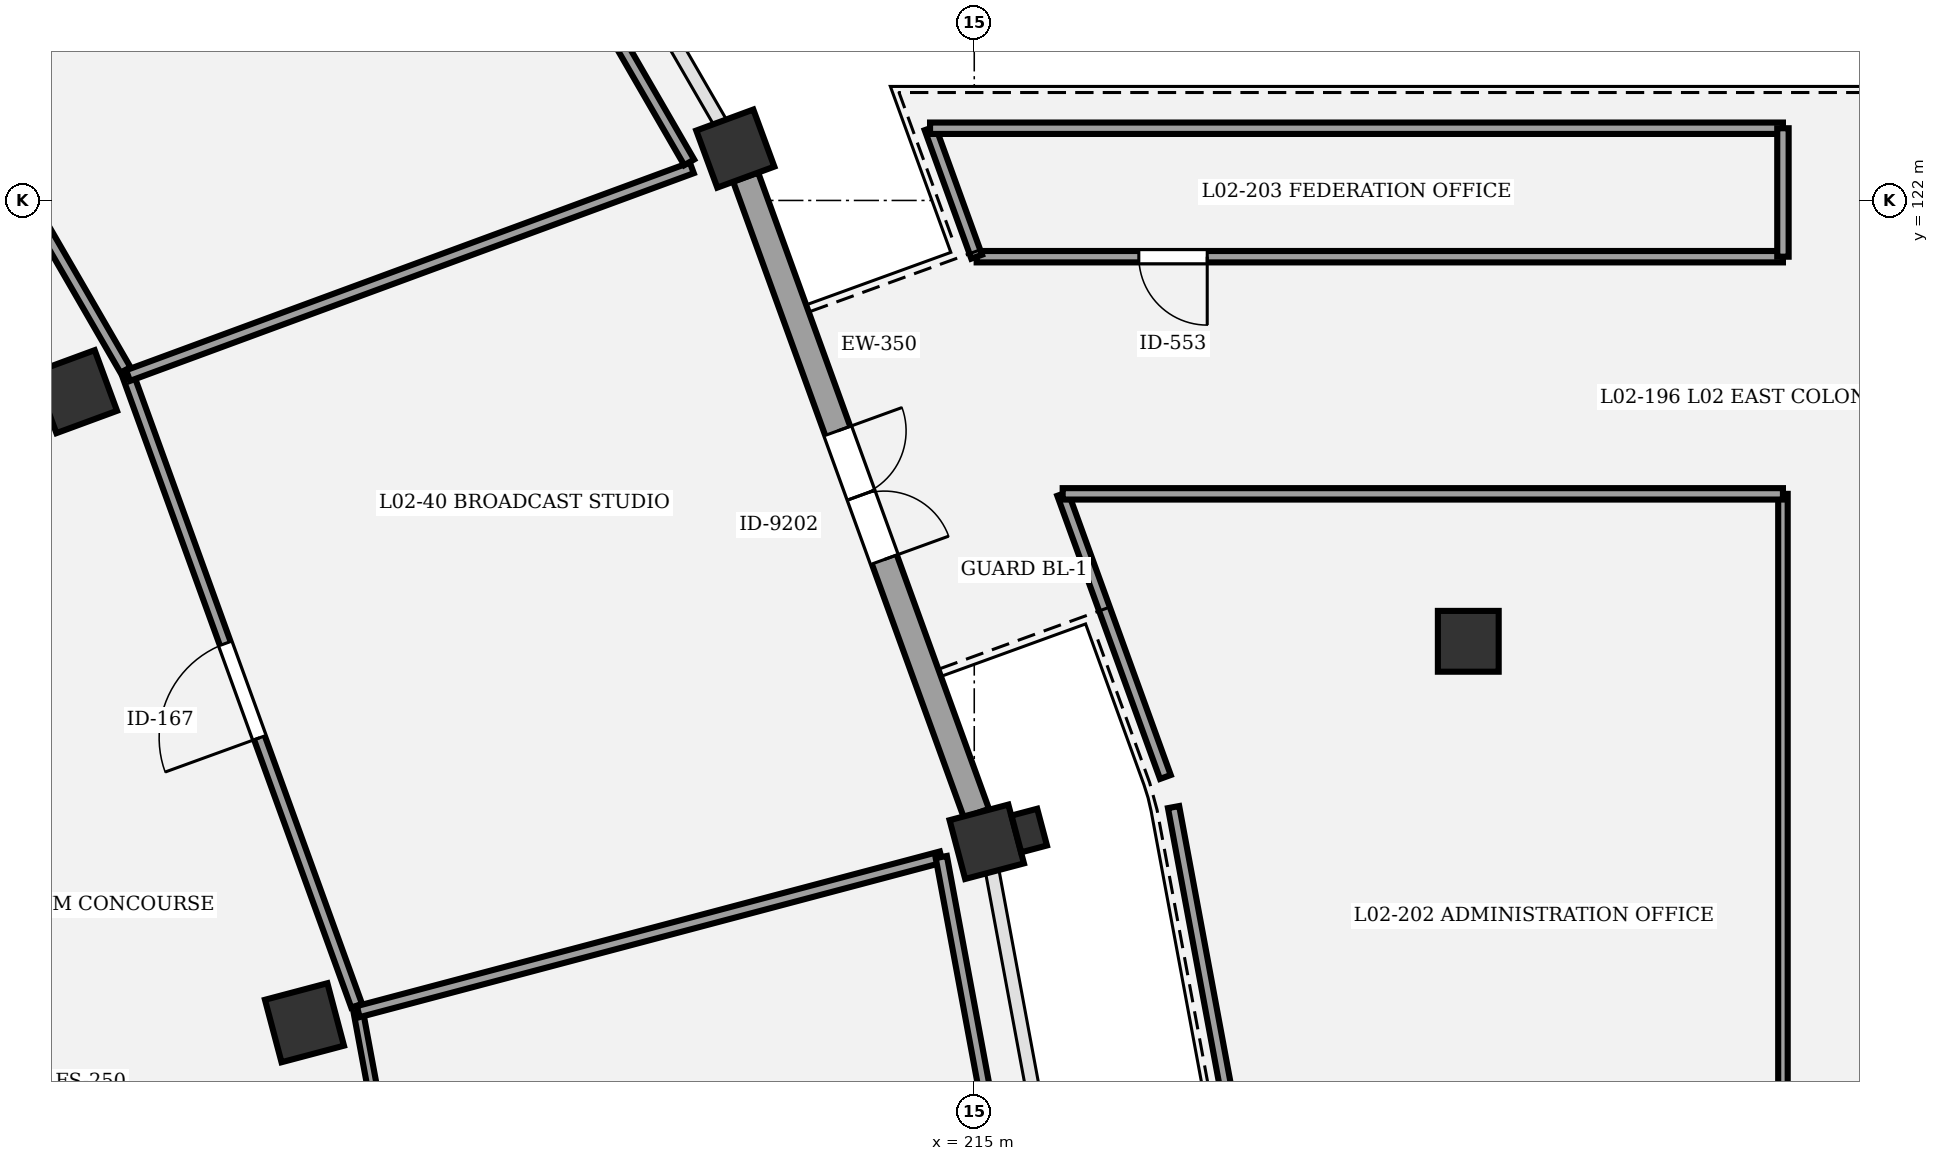
"""IFC4 building model, lengths in metres.
Left out: names, types, materials, properties, quantities, classifications, styles, units other than length and angle.
Written with IfcOpenShell. Run it as: python <this file> out.ifc"""

import sys

from ifc_helpers import new_model, si_unit, direction, frame, frame_2d, origin, origin_2d, place, context, subcontext, project, spatial, rectangle, circle, extrude, element, fill, save


model = new_model("IFC4")
c1 = context("Model", 3, precision=1e-05, world=origin(), true_north=direction((0.0, 1.0)))
c2 = subcontext(c1, "Body", "Model", "MODEL_VIEW")
j1 = project(units=[si_unit("LENGTHUNIT", "METRE"), si_unit("PLANEANGLEUNIT", "RADIAN")], contexts=[c1])
p1 = place(None, origin())
s1 = spatial("IfcSite", under=j1, at=p1, CompositionType="ELEMENT")
p2 = place(p1, origin())
s2 = spatial("IfcBuilding", under=s1, at=p2, CompositionType="ELEMENT")
p3 = place(p2, frame((0.0, 0.0, 10.2)))
s3 = spatial("IfcBuildingStorey", under=s2, at=p3, CompositionType="ELEMENT", Elevation=10.2)
p4 = place(p3, frame((206.188, 111.182, 0.0), z_axis=(0.0, 0.0, 1.0), x_axis=(0.966600102017, 0.256289373133, 0.0)))
e1 = element("IfcColumn", 1, at=p4, inside=s3, PredefinedType="COLUMN", context=c2, shape_type="SweptSolid", body=[
    extrude(rectangle(XDim=0.85, YDim=0.85, at=origin_2d()), origin(), (0.0, 0.0, 1.0), 4.5),
])
p5 = place(p3, frame((215.165, 113.562, 0.0), z_axis=(0.0, 0.0, 1.0), x_axis=(0.966600102017, 0.256289373133, 0.0)))
e2 = element("IfcColumn", 2, at=p5, inside=s3, PredefinedType="COLUMN", context=c2, shape_type="SweptSolid", body=[
    extrude(rectangle(XDim=0.8, YDim=0.8, at=origin_2d()), origin(), (0.0, 0.0, 1.0), 4.5),
])
p6 = place(p3, frame((215.723, 113.711, 0.0), z_axis=(0.0, 0.0, 1.0), x_axis=(-0.256289373133, 0.966600102017, 0.0)))
e3 = element("IfcColumn", 3, at=p6, inside=s3, PredefinedType="PILASTER", context=c2, shape_type="SweptSolid", body=[
    extrude(rectangle(XDim=0.5, YDim=0.35, at=origin_2d()), origin(), (0.0, 0.0, 1.0), 4.5),
])
p7 = place(p3, frame((203.176, 119.484, 0.0), z_axis=(0.0, 0.0, 1.0), x_axis=(0.938372433776, 0.34562577382, 0.0)))
e4 = element("IfcColumn", 4, at=p7, inside=s3, PredefinedType="COLUMN", context=c2, shape_type="SweptSolid", body=[
    extrude(rectangle(XDim=0.85, YDim=0.85, at=origin_2d()), origin(), (0.0, 0.0, 1.0), 4.5),
])
p8 = place(p3, frame((211.856, 122.682, 0.0), z_axis=(0.0, 0.0, 1.0), x_axis=(0.938372433776, 0.34562577382, 0.0)))
e5 = element("IfcColumn", 5, at=p8, inside=s3, PredefinedType="COLUMN", context=c2, shape_type="SweptSolid", body=[
    extrude(rectangle(XDim=0.8, YDim=0.8, at=origin_2d()), origin(), (0.0, 0.0, 1.0), 4.5),
])
p9 = place(p3, frame((221.5, 116.2, 0.0), z_axis=(0.0, 0.0, 1.0), x_axis=(1.0, 0.0, 0.0)))
e6 = element("IfcColumn", 6, at=p9, inside=s3, PredefinedType="COLUMN", context=c2, shape_type="SweptSolid", body=[
    extrude(circle(Radius=0.4, at=origin_2d()), origin(), (0.0, 0.0, 1.0), 4.5),
])
p10 = place(p3, frame((211.992, 122.308, 0.0), z_axis=(0.0, 0.0, 1.0), x_axis=(0.34103858998, -0.940049296657, 0.0)))
e7 = element("IfcWall", 7, at=p10, inside=s3, PredefinedType="STANDARD", context=c2, shape_type="SweptSolid", body=[
    extrude(rectangle(XDim=8.906, YDim=0.35, at=frame_2d((4.453, 0.0))), origin(), (0.0, 0.0, 1.0), 3.42),
])
p11 = place(p10, frame((3.553, 0.0, 0.0)))
e8 = element("IfcOpeningElement", 8, at=p11, cuts=e7, PredefinedType="OPENING", context=c2, shape_type="SweptSolid", body=[
    extrude(rectangle(XDim=1.8, YDim=2.4, at=frame_2d((0.9, 1.2))), frame((0.0, 0.185, 0.0), z_axis=(0.0, -1.0, 0.0), x_axis=(1.0, 0.0, 0.0)), (0.0, 0.0, 1.0), 0.37),
])
p12 = place(p3, frame((208.707, 101.575, 0.0), z_axis=(0.0, 0.0, 1.0), x_axis=(-0.182618024057, 0.983183938686, 0.0)))
e9 = element("IfcWall", 9, at=p12, inside=s3, PredefinedType="PARTITIONING", context=c2, shape_type="SweptSolid", body=[
    extrude(rectangle(XDim=9.92, YDim=0.125, at=frame_2d((4.96, 0.0))), origin(), (0.0, 0.0, 1.0), 3.25),
])
p13 = place(p12, frame((4.35, 0.0, 0.0)))
e10 = element("IfcOpeningElement", 10, at=p13, cuts=e9, PredefinedType="OPENING", context=c2, shape_type="SweptSolid", body=[
    extrude(rectangle(XDim=1.22, YDim=2.2, at=frame_2d((0.61, 1.1))), frame((0.0, 0.073, 0.0), z_axis=(0.0, -1.0, 0.0), x_axis=(1.0, 0.0, 0.0)), (0.0, 0.0, 1.0), 0.145),
])
p14 = place(p3, frame((206.874, 111.405, 0.0), z_axis=(0.0, 0.0, 1.0), x_axis=(-0.341031741571, 0.940051781149, 0.0)))
e11 = element("IfcWall", 11, at=p14, inside=s3, PredefinedType="PARTITIONING", context=c2, shape_type="SweptSolid", body=[
    extrude(rectangle(XDim=8.82, YDim=0.15, at=frame_2d((4.41, 0.0))), origin(), (0.0, 0.0, 1.0), 3.25),
])
p15 = place(p14, frame((3.75, 0.0, 0.0)))
e12 = element("IfcOpeningElement", 12, at=p15, cuts=e11, PredefinedType="OPENING", context=c2, shape_type="SweptSolid", body=[
    extrude(rectangle(XDim=1.32, YDim=2.2, at=frame_2d((0.66, 1.1))), frame((0.0, 0.085, 0.0), z_axis=(0.0, -1.0, 0.0), x_axis=(1.0, 0.0, 0.0)), (0.0, 0.0, 1.0), 0.17),
])
p16 = place(p3, frame((203.833, 119.769, 0.0), z_axis=(0.0, 0.0, 1.0), x_axis=(-0.500559280672, 0.865702262059, 0.0)))
e13 = element("IfcWall", 13, at=p16, inside=s3, PredefinedType="PARTITIONING", context=c2, shape_type="SweptSolid", body=[
    extrude(rectangle(XDim=8.375, YDim=0.15, at=frame_2d((4.187, 0.0))), origin(), (0.0, 0.0, 1.0), 3.25),
])
p17 = place(p16, frame((3.737, 0.0, 0.0)))
e14 = element("IfcOpeningElement", 14, at=p17, cuts=e13, PredefinedType="OPENING", context=c2, shape_type="SweptSolid", body=[
    extrude(rectangle(XDim=0.9, YDim=2.3, at=frame_2d((0.45, 1.15))), frame((0.0, 0.085, 0.0), z_axis=(0.0, -1.0, 0.0), x_axis=(1.0, 0.0, 0.0)), (0.0, 0.0, 1.0), 0.17),
])
p18 = place(p3, frame((225.64, 118.14, 0.0), z_axis=(0.0, 0.0, 1.0), x_axis=(0.0, -1.0, 0.0)))
e15 = element("IfcWall", 15, at=p18, inside=s3, PredefinedType="PARTITIONING", context=c2, shape_type="SweptSolid", body=[
    extrude(rectangle(XDim=18.69, YDim=0.125, at=frame_2d((9.345, 0.0))), origin(), (0.0, 0.0, 1.0), 3.25),
])
p19 = place(p18, frame((11.143, 0.0, 0.0)))
e16 = element("IfcOpeningElement", 16, at=p19, cuts=e15, PredefinedType="OPENING", context=c2, shape_type="SweptSolid", body=[
    extrude(rectangle(XDim=1.4, YDim=2.1, at=frame_2d((0.7, 1.05))), frame((0.0, 0.073, 0.0), z_axis=(0.0, -1.0, 0.0), x_axis=(1.0, 0.0, 0.0)), (0.0, 0.0, 1.0), 0.145),
])
p20 = place(p3, frame((225.64, 121.26, 0.0), z_axis=(0.0, 0.0, 1.0), x_axis=(-1.0, 0.0, 0.0)))
e17 = element("IfcWall", 17, at=p20, inside=s3, PredefinedType="PARTITIONING", context=c2, shape_type="SweptSolid", body=[
    extrude(rectangle(XDim=10.608, YDim=0.15, at=frame_2d((5.304, 0.0))), origin(), (0.0, 0.0, 1.0), 3.25),
])
p21 = place(p20, frame((7.575, 0.0, 0.0)))
e18 = element("IfcOpeningElement", 18, at=p21, cuts=e17, PredefinedType="OPENING", context=c2, shape_type="SweptSolid", body=[
    extrude(rectangle(XDim=0.9, YDim=2.2, at=frame_2d((0.45, 1.1))), frame((0.0, 0.085, 0.0), z_axis=(0.0, -1.0, 0.0), x_axis=(1.0, 0.0, 0.0)), (0.0, 0.0, 1.0), 0.17),
])
p22 = place(p3, frame((206.895, 111.328, 0.0), z_axis=(0.0, 0.0, 1.0), x_axis=(0.966593450181, 0.25631445934, 0.0)))
e19 = element("IfcWall", 19, at=p22, inside=s3, PredefinedType="PARTITIONING", context=c2, shape_type="SweptSolid", body=[
    extrude(rectangle(XDim=7.936, YDim=0.15, at=frame_2d((3.968, 0.0))), origin(), (0.0, 0.0, 1.0), 3.25),
])
p23 = place(p3, frame((214.566, 113.362, 0.0), z_axis=(0.0, 0.0, 1.0), x_axis=(0.182607868301, -0.983185824976, 0.0)))
e20 = element("IfcWall", 20, at=p23, inside=s3, PredefinedType="PARTITIONING", context=c2, shape_type="SweptSolid", body=[
    extrude(rectangle(XDim=10.755, YDim=0.15, at=frame_2d((5.377, 0.0))), origin(), (0.0, 0.0, 1.0), 3.25),
])
p24 = place(p3, frame((203.866, 119.696, 0.0), z_axis=(0.0, 0.0, 1.0), x_axis=(0.938346807893, 0.345695340028, 0.0)))
e21 = element("IfcWall", 21, at=p24, inside=s3, PredefinedType="PARTITIONING", context=c2, shape_type="SweptSolid", body=[
    extrude(rectangle(XDim=7.905, YDim=0.15, at=frame_2d((3.952, 0.0))), origin(), (0.0, 0.0, 1.0), 3.25),
])
p25 = place(p3, frame((206.704, 130.362, 0.0), z_axis=(0.0, 0.0, 1.0), x_axis=(0.500574107164, -0.865693689036, 0.0)))
e22 = element("IfcWall", 22, at=p25, inside=s3, PredefinedType="PARTITIONING", context=c2, shape_type="SweptSolid", body=[
    extrude(rectangle(XDim=9.08, YDim=0.15, at=frame_2d((4.54, 0.0))), origin(), (0.0, 0.0, 1.0), 3.25),
])
p26 = place(p3, frame((219.613, 103.302, 0.0), z_axis=(0.0, 0.0, 1.0), x_axis=(-0.182620957058, 0.983183393901, 0.0)))
e23 = element("IfcWall", 23, at=p26, inside=s3, PredefinedType="PARTITIONING", context=c2, shape_type="SweptSolid", body=[
    extrude(rectangle(XDim=10.901, YDim=0.15, at=frame_2d((5.45, 0.0))), origin(), (0.0, 0.0, 1.0), 3.25),
])
p27 = place(p3, frame((217.515, 114.415, 0.0), z_axis=(0.0, 0.0, 1.0), x_axis=(-0.341035525383, 0.94005040845, 0.0)))
e24 = element("IfcWall", 24, at=p27, inside=s3, PredefinedType="PARTITIONING", context=c2, shape_type="SweptSolid", body=[
    extrude(rectangle(XDim=3.962, YDim=0.15, at=frame_2d((1.981, 0.0))), origin(), (0.0, 0.0, 1.0), 3.25),
])
p28 = place(p3, frame((216.163, 118.14, 0.0), z_axis=(0.0, 0.0, 1.0), x_axis=(1.0, 0.0, 0.0)))
e25 = element("IfcWall", 25, at=p28, inside=s3, PredefinedType="PARTITIONING", context=c2, shape_type="SweptSolid", body=[
    extrude(rectangle(XDim=9.477, YDim=0.15, at=frame_2d((4.738, 0.0))), origin(), (0.0, 0.0, 1.0), 3.25),
])
p29 = place(p3, frame((215.031, 121.26, 0.0), z_axis=(0.0, 0.0, 1.0), x_axis=(-0.341012375502, 0.940058806541, 0.0)))
e26 = element("IfcWall", 26, at=p29, inside=s3, PredefinedType="PARTITIONING", context=c2, shape_type="SweptSolid", body=[
    extrude(rectangle(XDim=1.798, YDim=0.15, at=frame_2d((0.899, 0.0))), origin(), (0.0, 0.0, 1.0), 3.25),
])
p30 = place(p3, frame((214.418, 122.95, 0.0), z_axis=(0.0, 0.0, 1.0), x_axis=(1.0, 0.0, 0.0)))
e27 = element("IfcWall", 27, at=p30, inside=s3, PredefinedType="PARTITIONING", context=c2, shape_type="SweptSolid", body=[
    extrude(rectangle(XDim=11.221, YDim=0.15, at=frame_2d((5.611, 0.0))), origin(), (0.0, 0.0, 1.0), 3.25),
])
p31 = place(p3, frame((225.64, 122.95, 0.0), z_axis=(0.0, 0.0, 1.0), x_axis=(0.0, -1.0, 0.0)))
e28 = element("IfcWall", 28, at=p31, inside=s3, PredefinedType="PARTITIONING", context=c2, shape_type="SweptSolid", body=[
    extrude(rectangle(XDim=1.69, YDim=0.15, at=frame_2d((0.845, 0.0))), origin(), (0.0, 0.0, 1.0), 3.25),
])
p32 = place(p11, origin())
e29 = element("IfcDoor", 29, at=p32, inside=s3, OperationType="DOUBLE_DOOR_SINGLE_SWING", PredefinedType="DOOR", context=c2, shape_type="SweptSolid", body=[
    extrude(rectangle(XDim=1.8, YDim=2.4, at=frame_2d((0.9, 1.2))), frame((0.0, 0.025, 0.0), z_axis=(0.0, -1.0, 0.0), x_axis=(1.0, 0.0, 0.0)), (0.0, 0.0, 1.0), 0.05),
])
fill(e8, e29)
p33 = place(p15, origin())
e30 = element("IfcDoor", 30, at=p33, inside=s3, OperationType="SINGLE_SWING_LEFT", PredefinedType="DOOR", context=c2, shape_type="SweptSolid", body=[
    extrude(rectangle(XDim=1.32, YDim=2.2, at=frame_2d((0.66, 1.1))), frame((0.0, 0.025, 0.0), z_axis=(0.0, -1.0, 0.0), x_axis=(1.0, 0.0, 0.0)), (0.0, 0.0, 1.0), 0.05),
])
fill(e12, e30)
p34 = place(p21, origin())
e31 = element("IfcDoor", 31, at=p34, inside=s3, OperationType="SINGLE_SWING_LEFT", PredefinedType="DOOR", context=c2, shape_type="SweptSolid", body=[
    extrude(rectangle(XDim=0.9, YDim=2.2, at=frame_2d((0.45, 1.1))), frame((0.0, 0.025, 0.0), z_axis=(0.0, -1.0, 0.0), x_axis=(1.0, 0.0, 0.0)), (0.0, 0.0, 1.0), 0.05),
])
fill(e18, e31)
save(model, sys.argv[1])
